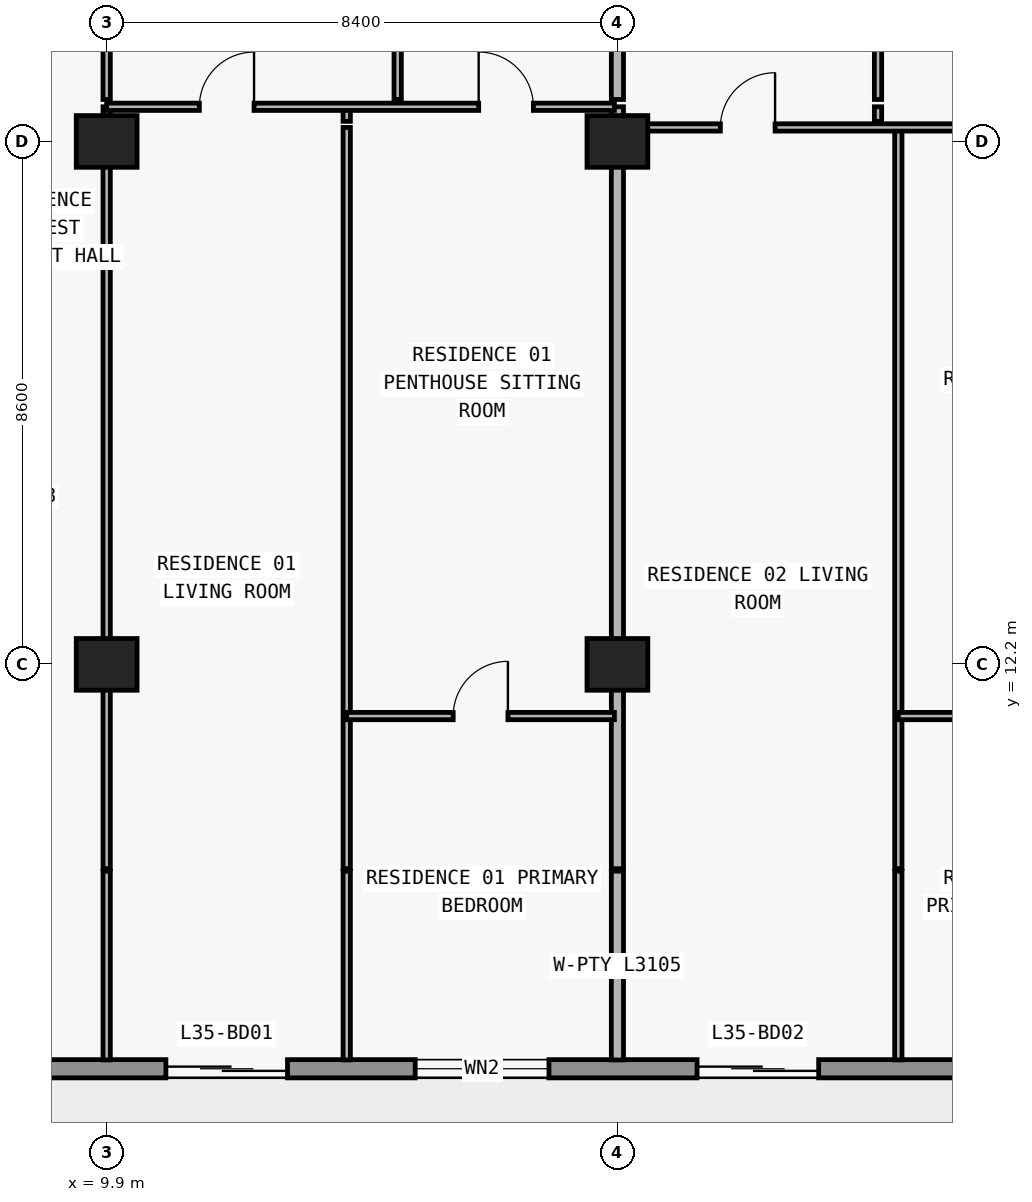
"""IFC4 building model, lengths in metres.
Left out: names, types, materials, properties, quantities, classifications, styles, units other than length and angle.
Written with IfcOpenShell. Run it as: python <this file> out.ifc"""

import sys

from ifc_helpers import new_model, si_unit, direction, frame, frame_2d, origin, origin_2d, place, context, subcontext, project, spatial, rectangle, extrude, element, fill, save


model = new_model("IFC4")
c1 = context("Model", 3, precision=1e-05, world=origin(), true_north=direction((0.0, 1.0)))
c2 = subcontext(c1, "Body", "Model", "MODEL_VIEW")
j1 = project(units=[si_unit("LENGTHUNIT", "METRE"), si_unit("PLANEANGLEUNIT", "RADIAN")], contexts=[c1])
p1 = place(None, origin())
s1 = spatial("IfcSite", under=j1, at=p1, CompositionType="ELEMENT")
p2 = place(p1, origin())
s2 = spatial("IfcBuilding", under=s1, at=p2, CompositionType="ELEMENT")
p3 = place(p2, frame((0.0, 0.0, 129.0)))
s3 = spatial("IfcBuildingStorey", under=s2, at=p3, CompositionType="ELEMENT", Elevation=129.0)
for number, where, z_axis, x_axis in (
    (1, (9.9, 12.2, 0.0), (0.0, 0.0, 1.0), (1.0, 0.0, 0.0)),
    (2, (18.3, 12.2, 0.0), (0.0, 0.0, 1.0), (1.0, 0.0, 0.0)),
    (3, (9.9, 20.8, 0.0), (0.0, 0.0, 1.0), (1.0, 0.0, 0.0)),
    (4, (18.3, 20.8, 0.0), (0.0, 0.0, 1.0), (1.0, 0.0, 0.0)),
):
    element("IfcColumn", number, at=place(p3, frame(where, z_axis=z_axis, x_axis=x_axis)), inside=s3, PredefinedType="COLUMN", context=c2, shape_type="SweptSolid", body=[
        extrude(rectangle(XDim=1.0, YDim=0.85, at=origin_2d()), origin(), (0.0, 0.0, 1.0), 3.05),
    ])
p4 = place(p3, frame((70.1, 5.55, 0.0), z_axis=(0.0, 0.0, 1.0), x_axis=(-1.0, 0.0, 0.0)))
e5 = element("IfcWall", 5, at=p4, inside=s3, PredefinedType="STANDARD", context=c2, shape_type="SweptSolid", body=[
    extrude(rectangle(XDim=62.4, YDim=0.3, at=frame_2d((31.2, 0.0))), origin(), (0.0, 0.0, 1.0), 3.05),
])
p5 = place(p4, frame((57.226, 0.0, 0.0)))
e6 = element("IfcOpeningElement", 6, at=p5, cuts=e5, PredefinedType="OPENING", context=c2, shape_type="SweptSolid", body=[
    extrude(rectangle(XDim=2.0, YDim=2.3, at=frame_2d((1.0, 1.15))), frame((0.0, 0.16, 0.0), z_axis=(0.0, -1.0, 0.0), x_axis=(1.0, 0.0, 0.0)), (0.0, 0.0, 1.0), 0.32),
])
p6 = place(p4, frame((52.926, 0.0, 0.85)))
e7 = element("IfcOpeningElement", 7, at=p6, cuts=e5, PredefinedType="OPENING", context=c2, shape_type="SweptSolid", body=[
    extrude(rectangle(XDim=2.2, YDim=1.55, at=frame_2d((1.1, 0.775))), frame((0.0, 0.16, 0.0), z_axis=(0.0, -1.0, 0.0), x_axis=(1.0, 0.0, 0.0)), (0.0, 0.0, 1.0), 0.32),
])
p7 = place(p4, frame((48.49, 0.0, 0.0)))
e8 = element("IfcOpeningElement", 8, at=p7, cuts=e5, PredefinedType="OPENING", context=c2, shape_type="SweptSolid", body=[
    extrude(rectangle(XDim=2.0, YDim=2.3, at=frame_2d((1.0, 1.15))), frame((0.0, 0.16, 0.0), z_axis=(0.0, -1.0, 0.0), x_axis=(1.0, 0.0, 0.0)), (0.0, 0.0, 1.0), 0.32),
])
p8 = place(p4, frame((44.39, 0.0, 0.85)))
e9 = element("IfcOpeningElement", 9, at=p8, cuts=e5, PredefinedType="OPENING", context=c2, shape_type="SweptSolid", body=[
    extrude(rectangle(XDim=1.8, YDim=1.55, at=frame_2d((0.9, 0.775))), frame((0.0, 0.16, 0.0), z_axis=(0.0, -1.0, 0.0), x_axis=(1.0, 0.0, 0.0)), (0.0, 0.0, 1.0), 0.32),
])
p9 = place(p4, frame((40.426, 0.0, 0.0)))
e10 = element("IfcOpeningElement", 10, at=p9, cuts=e5, PredefinedType="OPENING", context=c2, shape_type="SweptSolid", body=[
    extrude(rectangle(XDim=2.0, YDim=2.3, at=frame_2d((1.0, 1.15))), frame((0.0, 0.16, 0.0), z_axis=(0.0, -1.0, 0.0), x_axis=(1.0, 0.0, 0.0)), (0.0, 0.0, 1.0), 0.32),
])
p10 = place(p4, frame((36.126, 0.0, 0.85)))
e11 = element("IfcOpeningElement", 11, at=p10, cuts=e5, PredefinedType="OPENING", context=c2, shape_type="SweptSolid", body=[
    extrude(rectangle(XDim=2.2, YDim=1.55, at=frame_2d((1.1, 0.775))), frame((0.0, 0.16, 0.0), z_axis=(0.0, -1.0, 0.0), x_axis=(1.0, 0.0, 0.0)), (0.0, 0.0, 1.0), 0.32),
])
p11 = place(p4, frame((31.91, 0.0, 0.0)))
e12 = element("IfcOpeningElement", 12, at=p11, cuts=e5, PredefinedType="OPENING", context=c2, shape_type="SweptSolid", body=[
    extrude(rectangle(XDim=2.0, YDim=2.3, at=frame_2d((1.0, 1.15))), frame((0.0, 0.16, 0.0), z_axis=(0.0, -1.0, 0.0), x_axis=(1.0, 0.0, 0.0)), (0.0, 0.0, 1.0), 0.32),
])
p12 = place(p4, frame((28.21, 0.0, 0.85)))
e13 = element("IfcOpeningElement", 13, at=p12, cuts=e5, PredefinedType="OPENING", context=c2, shape_type="SweptSolid", body=[
    extrude(rectangle(XDim=1.8, YDim=1.55, at=frame_2d((0.9, 0.775))), frame((0.0, 0.16, 0.0), z_axis=(0.0, -1.0, 0.0), x_axis=(1.0, 0.0, 0.0)), (0.0, 0.0, 1.0), 0.32),
])
p13 = place(p4, frame((24.426, 0.0, 0.0)))
e14 = element("IfcOpeningElement", 14, at=p13, cuts=e5, PredefinedType="OPENING", context=c2, shape_type="SweptSolid", body=[
    extrude(rectangle(XDim=2.0, YDim=2.3, at=frame_2d((1.0, 1.15))), frame((0.0, 0.16, 0.0), z_axis=(0.0, -1.0, 0.0), x_axis=(1.0, 0.0, 0.0)), (0.0, 0.0, 1.0), 0.32),
])
p14 = place(p4, frame((20.126, 0.0, 0.85)))
e15 = element("IfcOpeningElement", 15, at=p14, cuts=e5, PredefinedType="OPENING", context=c2, shape_type="SweptSolid", body=[
    extrude(rectangle(XDim=2.2, YDim=1.55, at=frame_2d((1.1, 0.775))), frame((0.0, 0.16, 0.0), z_axis=(0.0, -1.0, 0.0), x_axis=(1.0, 0.0, 0.0)), (0.0, 0.0, 1.0), 0.32),
])
p15 = place(p4, frame((15.69, 0.0, 0.0)))
e16 = element("IfcOpeningElement", 16, at=p15, cuts=e5, PredefinedType="OPENING", context=c2, shape_type="SweptSolid", body=[
    extrude(rectangle(XDim=2.0, YDim=2.3, at=frame_2d((1.0, 1.15))), frame((0.0, 0.16, 0.0), z_axis=(0.0, -1.0, 0.0), x_axis=(1.0, 0.0, 0.0)), (0.0, 0.0, 1.0), 0.32),
])
p16 = place(p4, frame((11.59, 0.0, 0.85)))
e17 = element("IfcOpeningElement", 17, at=p16, cuts=e5, PredefinedType="OPENING", context=c2, shape_type="SweptSolid", body=[
    extrude(rectangle(XDim=1.8, YDim=1.55, at=frame_2d((0.9, 0.775))), frame((0.0, 0.16, 0.0), z_axis=(0.0, -1.0, 0.0), x_axis=(1.0, 0.0, 0.0)), (0.0, 0.0, 1.0), 0.32),
])
p17 = place(p4, frame((7.626, 0.0, 0.0)))
e18 = element("IfcOpeningElement", 18, at=p17, cuts=e5, PredefinedType="OPENING", context=c2, shape_type="SweptSolid", body=[
    extrude(rectangle(XDim=2.0, YDim=2.3, at=frame_2d((1.0, 1.15))), frame((0.0, 0.16, 0.0), z_axis=(0.0, -1.0, 0.0), x_axis=(1.0, 0.0, 0.0)), (0.0, 0.0, 1.0), 0.32),
])
p18 = place(p4, frame((3.326, 0.0, 0.85)))
e19 = element("IfcOpeningElement", 19, at=p18, cuts=e5, PredefinedType="OPENING", context=c2, shape_type="SweptSolid", body=[
    extrude(rectangle(XDim=2.2, YDim=1.55, at=frame_2d((1.1, 0.775))), frame((0.0, 0.16, 0.0), z_axis=(0.0, -1.0, 0.0), x_axis=(1.0, 0.0, 0.0)), (0.0, 0.0, 1.0), 0.32),
])
p19 = place(p3, frame((9.9, 5.695, 0.0), z_axis=(0.0, 0.0, 1.0), x_axis=(0.0, 1.0, 0.0)))
e20 = element("IfcWall", 20, at=p19, inside=s3, PredefinedType="PARTITIONING", context=c2, shape_type="SweptSolid", body=[
    extrude(rectangle(XDim=3.105, YDim=0.12, at=frame_2d((1.552, 0.0))), origin(), (0.0, 0.0, 1.0), 3.05),
])
p20 = place(p3, frame((9.9, 8.84, 0.0), z_axis=(0.0, 0.0, 1.0), x_axis=(0.0, 1.0, 0.0)))
e21 = element("IfcWall", 21, at=p20, inside=s3, PredefinedType="PARTITIONING", context=c2, shape_type="SweptSolid", body=[
    extrude(rectangle(XDim=12.19, YDim=0.12, at=frame_2d((6.095, 0.0))), origin(), (0.0, 0.0, 1.0), 2.174),
])
p21 = place(p3, frame((9.9, 21.13, 0.0), z_axis=(0.0, 0.0, 1.0), x_axis=(0.0, 1.0, 0.0)))
e22 = element("IfcWall", 22, at=p21, inside=s3, PredefinedType="PARTITIONING", context=c2, shape_type="SweptSolid", body=[
    extrude(rectangle(XDim=0.24, YDim=0.12, at=frame_2d((0.12, 0.0))), origin(), (0.0, 0.0, 1.0), 2.174),
])
p22 = place(p3, frame((9.9, 21.49, 0.0), z_axis=(0.0, 0.0, 1.0), x_axis=(0.0, 1.0, 0.0)))
e23 = element("IfcWall", 23, at=p22, inside=s3, PredefinedType="PARTITIONING", context=c2, shape_type="SweptSolid", body=[
    extrude(rectangle(XDim=4.69, YDim=0.12, at=frame_2d((2.345, 0.0))), origin(), (0.0, 0.0, 1.0), 2.174),
])
p23 = place(p22, frame((1.895, 0.0, 0.0)))
e24 = element("IfcOpeningElement", 24, at=p23, cuts=e23, PredefinedType="OPENING", context=c2, shape_type="SweptSolid", body=[
    extrude(rectangle(XDim=0.9, YDim=2.124, at=frame_2d((0.45, 1.062))), frame((0.0, 0.07, 0.0), z_axis=(0.0, -1.0, 0.0), x_axis=(1.0, 0.0, 0.0)), (0.0, 0.0, 1.0), 0.14),
])
p24 = place(p3, frame((13.848, 5.695, 0.0), z_axis=(0.0, 0.0, 1.0), x_axis=(0.0, 1.0, 0.0)))
e25 = element("IfcWall", 25, at=p24, inside=s3, PredefinedType="PARTITIONING", context=c2, shape_type="SweptSolid", body=[
    extrude(rectangle(XDim=3.105, YDim=0.12, at=frame_2d((1.552, 0.0))), origin(), (0.0, 0.0, 1.0), 3.05),
])
p25 = place(p3, frame((13.848, 8.84, 0.0), z_axis=(0.0, 0.0, 1.0), x_axis=(0.0, 1.0, 0.0)))
e26 = element("IfcWall", 26, at=p25, inside=s3, PredefinedType="PARTITIONING", context=c2, shape_type="SweptSolid", body=[
    extrude(rectangle(XDim=12.19, YDim=0.12, at=frame_2d((6.095, 0.0))), origin(), (0.0, 0.0, 1.0), 3.05),
])
p26 = place(p3, frame((13.848, 21.13, 0.0), z_axis=(0.0, 0.0, 1.0), x_axis=(0.0, 1.0, 0.0)))
e27 = element("IfcWall", 27, at=p26, inside=s3, PredefinedType="PARTITIONING", context=c2, shape_type="SweptSolid", body=[
    extrude(rectangle(XDim=0.24, YDim=0.12, at=frame_2d((0.12, 0.0))), origin(), (0.0, 0.0, 1.0), 3.05),
])
p27 = place(p3, frame((14.686, 21.49, 0.0), z_axis=(0.0, 0.0, 1.0), x_axis=(0.0, 1.0, 0.0)))
e28 = element("IfcWall", 28, at=p27, inside=s3, PredefinedType="PARTITIONING", context=c2, shape_type="SweptSolid", body=[
    extrude(rectangle(XDim=4.69, YDim=0.12, at=frame_2d((2.345, 0.0))), origin(), (0.0, 0.0, 1.0), 3.05),
])
p28 = place(p27, frame((1.895, 0.0, 0.0)))
e29 = element("IfcOpeningElement", 29, at=p28, cuts=e28, PredefinedType="OPENING", context=c2, shape_type="SweptSolid", body=[
    extrude(rectangle(XDim=0.9, YDim=2.15, at=frame_2d((0.45, 1.075))), frame((0.0, 0.07, 0.0), z_axis=(0.0, -1.0, 0.0), x_axis=(1.0, 0.0, 0.0)), (0.0, 0.0, 1.0), 0.14),
])
p29 = place(p3, frame((18.3, 5.695, 0.0), z_axis=(0.0, 0.0, 1.0), x_axis=(0.0, 1.0, 0.0)))
e30 = element("IfcWall", 30, at=p29, inside=s3, PredefinedType="PARTITIONING", context=c2, shape_type="SweptSolid", body=[
    extrude(rectangle(XDim=3.105, YDim=0.2, at=frame_2d((1.552, 0.0))), origin(), (0.0, 0.0, 1.0), 3.05),
])
p30 = place(p3, frame((18.3, 8.84, 0.0), z_axis=(0.0, 0.0, 1.0), x_axis=(0.0, 1.0, 0.0)))
e31 = element("IfcWall", 31, at=p30, inside=s3, PredefinedType="PARTITIONING", context=c2, shape_type="SweptSolid", body=[
    extrude(rectangle(XDim=12.19, YDim=0.2, at=frame_2d((6.095, 0.0))), origin(), (0.0, 0.0, 1.0), 2.174),
])
p31 = place(p3, frame((18.3, 21.13, 0.0), z_axis=(0.0, 0.0, 1.0), x_axis=(0.0, 1.0, 0.0)))
e32 = element("IfcWall", 32, at=p31, inside=s3, PredefinedType="PARTITIONING", context=c2, shape_type="SweptSolid", body=[
    extrude(rectangle(XDim=0.24, YDim=0.2, at=frame_2d((0.12, 0.0))), origin(), (0.0, 0.0, 1.0), 2.174),
])
p32 = place(p3, frame((18.3, 21.49, 0.0), z_axis=(0.0, 0.0, 1.0), x_axis=(0.0, 1.0, 0.0)))
e33 = element("IfcWall", 33, at=p32, inside=s3, PredefinedType="PARTITIONING", context=c2, shape_type="SweptSolid", body=[
    extrude(rectangle(XDim=4.69, YDim=0.2, at=frame_2d((2.345, 0.0))), origin(), (0.0, 0.0, 1.0), 2.174),
])
p33 = place(p3, frame((22.586, 21.13, 0.0), z_axis=(0.0, 0.0, 1.0), x_axis=(0.0, 1.0, 0.0)))
e34 = element("IfcWall", 34, at=p33, inside=s3, PredefinedType="PARTITIONING", context=c2, shape_type="SweptSolid", body=[
    extrude(rectangle(XDim=0.24, YDim=0.12, at=frame_2d((0.12, 0.0))), origin(), (0.0, 0.0, 1.0), 3.05),
])
p34 = place(p3, frame((22.586, 21.49, 0.0), z_axis=(0.0, 0.0, 1.0), x_axis=(0.0, 1.0, 0.0)))
e35 = element("IfcWall", 35, at=p34, inside=s3, PredefinedType="PARTITIONING", context=c2, shape_type="SweptSolid", body=[
    extrude(rectangle(XDim=4.69, YDim=0.12, at=frame_2d((2.345, 0.0))), origin(), (0.0, 0.0, 1.0), 3.05),
])
p35 = place(p34, frame((1.895, 0.0, 0.0)))
e36 = element("IfcOpeningElement", 36, at=p35, cuts=e35, PredefinedType="OPENING", context=c2, shape_type="SweptSolid", body=[
    extrude(rectangle(XDim=0.9, YDim=2.15, at=frame_2d((0.45, 1.075))), frame((0.0, 0.07, 0.0), z_axis=(0.0, -1.0, 0.0), x_axis=(1.0, 0.0, 0.0)), (0.0, 0.0, 1.0), 0.14),
])
p36 = place(p3, frame((22.92, 5.695, 0.0), z_axis=(0.0, 0.0, 1.0), x_axis=(0.0, 1.0, 0.0)))
e37 = element("IfcWall", 37, at=p36, inside=s3, PredefinedType="PARTITIONING", context=c2, shape_type="SweptSolid", body=[
    extrude(rectangle(XDim=3.105, YDim=0.12, at=frame_2d((1.552, 0.0))), origin(), (0.0, 0.0, 1.0), 3.05),
])
p37 = place(p3, frame((22.92, 8.84, 0.0), z_axis=(0.0, 0.0, 1.0), x_axis=(0.0, 1.0, 0.0)))
e38 = element("IfcWall", 38, at=p37, inside=s3, PredefinedType="PARTITIONING", context=c2, shape_type="SweptSolid", body=[
    extrude(rectangle(XDim=12.19, YDim=0.12, at=frame_2d((6.095, 0.0))), origin(), (0.0, 0.0, 1.0), 3.05),
])
p38 = place(p3, frame((13.848, 11.35, 0.0), z_axis=(0.0, 0.0, 1.0), x_axis=(1.0, 0.0, 0.0)))
e39 = element("IfcWall", 39, at=p38, inside=s3, PredefinedType="PARTITIONING", context=c2, shape_type="SweptSolid", body=[
    extrude(rectangle(XDim=4.402, YDim=0.12, at=frame_2d((2.201, 0.0))), origin(), (0.0, 0.0, 1.0), 3.05),
])
p39 = place(p38, frame((1.751, 0.0, 0.0)))
e40 = element("IfcOpeningElement", 40, at=p39, cuts=e39, PredefinedType="OPENING", context=c2, shape_type="SweptSolid", body=[
    extrude(rectangle(XDim=0.9, YDim=2.15, at=frame_2d((0.45, 1.075))), frame((0.0, 0.07, 0.0), z_axis=(0.0, -1.0, 0.0), x_axis=(1.0, 0.0, 0.0)), (0.0, 0.0, 1.0), 0.14),
])
p40 = place(p3, frame((22.92, 11.35, 0.0), z_axis=(0.0, 0.0, 1.0), x_axis=(1.0, 0.0, 0.0)))
e41 = element("IfcWall", 41, at=p40, inside=s3, PredefinedType="PARTITIONING", context=c2, shape_type="SweptSolid", body=[
    extrude(rectangle(XDim=3.73, YDim=0.12, at=frame_2d((1.865, 0.0))), origin(), (0.0, 0.0, 1.0), 3.05),
])
p41 = place(p40, frame((1.415, 0.0, 0.0)))
e42 = element("IfcOpeningElement", 42, at=p41, cuts=e41, PredefinedType="OPENING", context=c2, shape_type="SweptSolid", body=[
    extrude(rectangle(XDim=0.9, YDim=2.15, at=frame_2d((0.45, 1.075))), frame((0.0, 0.07, 0.0), z_axis=(0.0, -1.0, 0.0), x_axis=(1.0, 0.0, 0.0)), (0.0, 0.0, 1.0), 0.14),
])
p42 = place(p3, frame((18.3, 21.03, 0.0), z_axis=(0.0, 0.0, 1.0), x_axis=(1.0, 0.0, 0.0)))
e43 = element("IfcWall", 43, at=p42, inside=s3, PredefinedType="PARTITIONING", context=c2, shape_type="SweptSolid", body=[
    extrude(rectangle(XDim=8.18, YDim=0.12, at=frame_2d((4.09, 0.0))), origin(), (0.0, 0.0, 1.0), 2.174),
])
p43 = place(p42, frame((1.693, 0.0, 0.0)))
e44 = element("IfcOpeningElement", 44, at=p43, cuts=e43, PredefinedType="OPENING", context=c2, shape_type="SweptSolid", body=[
    extrude(rectangle(XDim=0.9, YDim=2.124, at=frame_2d((0.45, 1.062))), frame((0.0, 0.07, 0.0), z_axis=(0.0, -1.0, 0.0), x_axis=(1.0, 0.0, 0.0)), (0.0, 0.0, 1.0), 0.14),
])
p44 = place(p42, frame((5.95, 0.0, 0.0)))
e45 = element("IfcOpeningElement", 45, at=p44, cuts=e43, PredefinedType="OPENING", context=c2, shape_type="SweptSolid", body=[
    extrude(rectangle(XDim=0.9, YDim=2.124, at=frame_2d((0.45, 1.062))), frame((0.0, 0.07, 0.0), z_axis=(0.0, -1.0, 0.0), x_axis=(1.0, 0.0, 0.0)), (0.0, 0.0, 1.0), 0.14),
])
p45 = place(p3, frame((9.9, 21.37, 0.0), z_axis=(0.0, 0.0, 1.0), x_axis=(1.0, 0.0, 0.0)))
e46 = element("IfcWall", 46, at=p45, inside=s3, PredefinedType="PARTITIONING", context=c2, shape_type="SweptSolid", body=[
    extrude(rectangle(XDim=8.35, YDim=0.12, at=frame_2d((4.175, 0.0))), origin(), (0.0, 0.0, 1.0), 3.05),
])
p46 = place(p45, frame((1.524, 0.0, 0.0)))
e47 = element("IfcOpeningElement", 47, at=p46, cuts=e46, PredefinedType="OPENING", context=c2, shape_type="SweptSolid", body=[
    extrude(rectangle(XDim=0.9, YDim=2.15, at=frame_2d((0.45, 1.075))), frame((0.0, 0.07, 0.0), z_axis=(0.0, -1.0, 0.0), x_axis=(1.0, 0.0, 0.0)), (0.0, 0.0, 1.0), 0.14),
])
p47 = place(p45, frame((6.118, 0.0, 0.0)))
e48 = element("IfcOpeningElement", 48, at=p47, cuts=e46, PredefinedType="OPENING", context=c2, shape_type="SweptSolid", body=[
    extrude(rectangle(XDim=0.9, YDim=2.15, at=frame_2d((0.45, 1.075))), frame((0.0, 0.07, 0.0), z_axis=(0.0, -1.0, 0.0), x_axis=(1.0, 0.0, 0.0)), (0.0, 0.0, 1.0), 0.14),
])
p48 = place(p5, origin())
e49 = element("IfcDoor", 49, at=p48, inside=s3, OperationType="DOUBLE_DOOR_SLIDING", PredefinedType="DOOR", context=c2, shape_type="SweptSolid", body=[
    extrude(rectangle(XDim=2.0, YDim=2.3, at=frame_2d((1.0, 1.15))), frame((0.0, 0.025, 0.0), z_axis=(0.0, -1.0, 0.0), x_axis=(1.0, 0.0, 0.0)), (0.0, 0.0, 1.0), 0.05),
])
fill(e6, e49)
p49 = place(p6, origin())
e50 = element("IfcWindow", 50, at=p49, inside=s3, PartitioningType="SINGLE_PANEL", PredefinedType="WINDOW", context=c2, shape_type="SweptSolid", body=[
    extrude(rectangle(XDim=2.2, YDim=1.55, at=frame_2d((1.1, 0.775))), frame((0.0, 0.03, 0.0), z_axis=(0.0, -1.0, 0.0), x_axis=(1.0, 0.0, 0.0)), (0.0, 0.0, 1.0), 0.06),
])
fill(e7, e50)
p50 = place(p7, origin())
e51 = element("IfcDoor", 51, at=p50, inside=s3, OperationType="DOUBLE_DOOR_SLIDING", PredefinedType="DOOR", context=c2, shape_type="SweptSolid", body=[
    extrude(rectangle(XDim=2.0, YDim=2.3, at=frame_2d((1.0, 1.15))), frame((0.0, 0.025, 0.0), z_axis=(0.0, -1.0, 0.0), x_axis=(1.0, 0.0, 0.0)), (0.0, 0.0, 1.0), 0.05),
])
fill(e8, e51)
p51 = place(p46, origin())
e52 = element("IfcDoor", 52, at=p51, inside=s3, OperationType="SINGLE_SWING_RIGHT", PredefinedType="DOOR", context=c2, shape_type="SweptSolid", body=[
    extrude(rectangle(XDim=0.9, YDim=2.15, at=frame_2d((0.45, 1.075))), frame((0.0, 0.025, 0.0), z_axis=(0.0, -1.0, 0.0), x_axis=(1.0, 0.0, 0.0)), (0.0, 0.0, 1.0), 0.05),
])
fill(e47, e52)
p52 = place(p47, origin())
e53 = element("IfcDoor", 53, at=p52, inside=s3, OperationType="SINGLE_SWING_LEFT", PredefinedType="DOOR", context=c2, shape_type="SweptSolid", body=[
    extrude(rectangle(XDim=0.9, YDim=2.15, at=frame_2d((0.45, 1.075))), frame((0.0, 0.025, 0.0), z_axis=(0.0, -1.0, 0.0), x_axis=(1.0, 0.0, 0.0)), (0.0, 0.0, 1.0), 0.05),
])
fill(e48, e53)
p53 = place(p39, origin())
e54 = element("IfcDoor", 54, at=p53, inside=s3, OperationType="SINGLE_SWING_RIGHT", PredefinedType="DOOR", context=c2, shape_type="SweptSolid", body=[
    extrude(rectangle(XDim=0.9, YDim=2.15, at=frame_2d((0.45, 1.075))), frame((0.0, 0.025, 0.0), z_axis=(0.0, -1.0, 0.0), x_axis=(1.0, 0.0, 0.0)), (0.0, 0.0, 1.0), 0.05),
])
fill(e40, e54)
p54 = place(p43, origin())
e55 = element("IfcDoor", 55, at=p54, inside=s3, OperationType="SINGLE_SWING_RIGHT", PredefinedType="DOOR", context=c2, shape_type="SweptSolid", body=[
    extrude(rectangle(XDim=0.9, YDim=2.124, at=frame_2d((0.45, 1.062))), frame((0.0, 0.025, 0.0), z_axis=(0.0, -1.0, 0.0), x_axis=(1.0, 0.0, 0.0)), (0.0, 0.0, 1.0), 0.05),
])
fill(e44, e55)
save(model, sys.argv[1])
